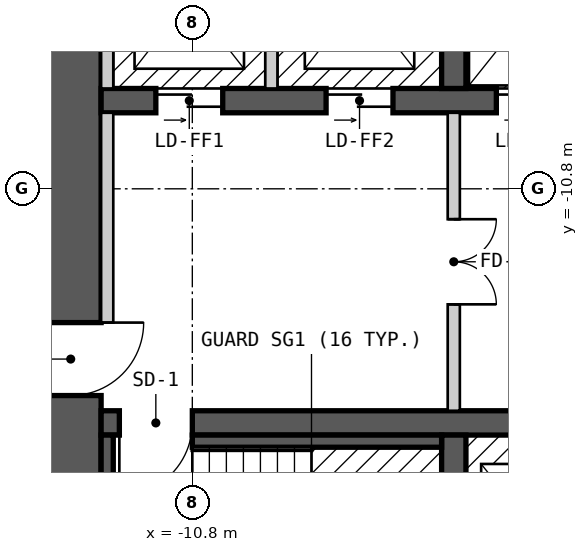
"""IFC4 building model, lengths in metres.
Left out: names, types, materials, properties, quantities, classifications, styles, units other than length and angle.
Written with IfcOpenShell. Run it as: python <this file> out.ifc"""

import sys

from ifc_helpers import new_model, si_unit, direction, frame, frame_2d, origin, place, context, subcontext, project, spatial, rectangle, extrude, element, fill, save


model = new_model("IFC4")
c1 = context("Model", 3, precision=1e-05, world=origin(), true_north=direction((0.0, 1.0)))
c2 = subcontext(c1, "Body", "Model", "MODEL_VIEW")
j1 = project(units=[si_unit("LENGTHUNIT", "METRE"), si_unit("PLANEANGLEUNIT", "RADIAN")], contexts=[c1])
p1 = place(None, origin())
s1 = spatial("IfcSite", under=j1, at=p1, CompositionType="ELEMENT")
p2 = place(p1, origin())
s2 = spatial("IfcBuilding", under=s1, at=p2, CompositionType="ELEMENT")
p3 = place(p2, frame((0.0, 0.0, 90.0)))
s3 = spatial("IfcBuildingStorey", under=s2, at=p3, CompositionType="ELEMENT", Elevation=90.0)
p4 = place(p3, frame((-12.8, -18.0, 0.0), z_axis=(0.0, 0.0, 1.0), x_axis=(0.0, 1.0, 0.0)))
e1 = element("IfcWall", 1, at=p4, inside=s3, PredefinedType="SHEAR", context=c2, shape_type="SweptSolid", body=[
    extrude(rectangle(XDim=12.0, YDim=1.0, at=frame_2d((6.0, 0.0))), origin(), (0.0, 0.0, 1.0), 2.7),
])
p5 = place(p4, frame((3.8, 0.0, 0.0)))
e2 = element("IfcOpeningElement", 2, at=p5, cuts=e1, PredefinedType="OPENING", context=c2, shape_type="SweptSolid", body=[
    extrude(rectangle(XDim=1.2, YDim=2.1, at=frame_2d((0.6, 1.05))), frame((0.0, 0.51, 0.0), z_axis=(0.0, -1.0, 0.0), x_axis=(1.0, 0.0, 0.0)), (0.0, 0.0, 1.0), 1.02),
])
p6 = place(p3, frame((-12.3, -14.65, 0.0), z_axis=(0.0, 0.0, 1.0), x_axis=(1.0, 0.0, 0.0)))
e3 = element("IfcWall", 3, at=p6, inside=s3, PredefinedType="SHEAR", context=c2, shape_type="SweptSolid", body=[
    extrude(rectangle(XDim=24.6, YDim=0.4, at=frame_2d((12.3, 0.0))), origin(), (0.0, 0.0, 1.0), 2.7),
])
p7 = place(p6, frame((1.5, 0.0, 0.0), z_axis=(0.0, 0.0, 1.0), x_axis=(-1.0, 0.0, 0.0)))
e4 = element("IfcOpeningElement", 4, at=p7, cuts=e3, PredefinedType="OPENING", context=c2, shape_type="SweptSolid", body=[
    extrude(rectangle(XDim=1.2, YDim=2.1, at=frame_2d((0.6, 1.05))), frame((0.0, 0.21, 0.0), z_axis=(0.0, -1.0, 0.0), x_axis=(1.0, 0.0, 0.0)), (0.0, 0.0, 1.0), 0.42),
])
p8 = place(p6, frame((24.35, 0.0, 0.0), z_axis=(0.0, 0.0, 1.0), x_axis=(-1.0, 0.0, 0.0)))
e5 = element("IfcOpeningElement", 5, at=p8, cuts=e3, PredefinedType="OPENING", context=c2, shape_type="SweptSolid", body=[
    extrude(rectangle(XDim=1.2, YDim=2.1, at=frame_2d((0.6, 1.05))), frame((0.0, 0.21, 0.0), z_axis=(0.0, -1.0, 0.0), x_axis=(1.0, 0.0, 0.0)), (0.0, 0.0, 1.0), 0.42),
])
p9 = place(p6, frame((16.8, 0.0, 0.0), z_axis=(0.0, 0.0, 1.0), x_axis=(-1.0, 0.0, 0.0)))
e6 = element("IfcOpeningElement", 6, at=p9, cuts=e3, PredefinedType="OPENING", context=c2, shape_type="SweptSolid", body=[
    extrude(rectangle(XDim=1.0, YDim=2.1, at=frame_2d((0.5, 1.05))), frame((0.0, 0.21, 0.0), z_axis=(0.0, -1.0, 0.0), x_axis=(1.0, 0.0, 0.0)), (0.0, 0.0, 1.0), 0.42),
])
p10 = place(p6, frame((18.55, 0.0, 0.0), z_axis=(0.0, 0.0, 1.0), x_axis=(-1.0, 0.0, 0.0)))
e7 = element("IfcOpeningElement", 7, at=p10, cuts=e3, PredefinedType="OPENING", context=c2, shape_type="SweptSolid", body=[
    extrude(rectangle(XDim=0.9, YDim=2.1, at=frame_2d((0.45, 1.05))), frame((0.0, 0.21, 0.0), z_axis=(0.0, -1.0, 0.0), x_axis=(1.0, 0.0, 0.0)), (0.0, 0.0, 1.0), 0.42),
])
p11 = place(p3, frame((-12.3, -9.35, 0.0), z_axis=(0.0, 0.0, 1.0), x_axis=(1.0, 0.0, 0.0)))
e8 = element("IfcWall", 8, at=p11, inside=s3, PredefinedType="SHEAR", context=c2, shape_type="SweptSolid", body=[
    extrude(rectangle(XDim=22.5, YDim=0.4, at=frame_2d((11.25, 0.0))), origin(), (0.0, 0.0, 1.0), 2.7),
])
p12 = place(p11, frame((0.9, 0.0, 0.0)))
e9 = element("IfcOpeningElement", 9, at=p12, cuts=e8, PredefinedType="OPENING", context=c2, shape_type="SweptSolid", body=[
    extrude(rectangle(XDim=1.1, YDim=2.1, at=frame_2d((0.55, 1.05))), frame((0.0, 0.21, 0.0), z_axis=(0.0, -1.0, 0.0), x_axis=(1.0, 0.0, 0.0)), (0.0, 0.0, 1.0), 0.42),
])
p13 = place(p11, frame((3.7, 0.0, 0.0)))
e10 = element("IfcOpeningElement", 10, at=p13, cuts=e8, PredefinedType="OPENING", context=c2, shape_type="SweptSolid", body=[
    extrude(rectangle(XDim=1.1, YDim=2.1, at=frame_2d((0.55, 1.05))), frame((0.0, 0.21, 0.0), z_axis=(0.0, -1.0, 0.0), x_axis=(1.0, 0.0, 0.0)), (0.0, 0.0, 1.0), 0.42),
])
p14 = place(p11, frame((6.5, 0.0, 0.0)))
e11 = element("IfcOpeningElement", 11, at=p14, cuts=e8, PredefinedType="OPENING", context=c2, shape_type="SweptSolid", body=[
    extrude(rectangle(XDim=1.1, YDim=2.1, at=frame_2d((0.55, 1.05))), frame((0.0, 0.21, 0.0), z_axis=(0.0, -1.0, 0.0), x_axis=(1.0, 0.0, 0.0)), (0.0, 0.0, 1.0), 0.42),
])
p15 = place(p11, frame((8.8, 0.0, 0.0)))
e12 = element("IfcOpeningElement", 12, at=p15, cuts=e8, PredefinedType="OPENING", context=c2, shape_type="SweptSolid", body=[
    extrude(rectangle(XDim=1.1, YDim=2.1, at=frame_2d((0.55, 1.05))), frame((0.0, 0.21, 0.0), z_axis=(0.0, -1.0, 0.0), x_axis=(1.0, 0.0, 0.0)), (0.0, 0.0, 1.0), 0.42),
])
p16 = place(p11, frame((11.1, 0.0, 0.0)))
e13 = element("IfcOpeningElement", 13, at=p16, cuts=e8, PredefinedType="OPENING", context=c2, shape_type="SweptSolid", body=[
    extrude(rectangle(XDim=1.1, YDim=2.1, at=frame_2d((0.55, 1.05))), frame((0.0, 0.21, 0.0), z_axis=(0.0, -1.0, 0.0), x_axis=(1.0, 0.0, 0.0)), (0.0, 0.0, 1.0), 0.42),
])
p17 = place(p11, frame((13.4, 0.0, 0.0)))
e14 = element("IfcOpeningElement", 14, at=p17, cuts=e8, PredefinedType="OPENING", context=c2, shape_type="SweptSolid", body=[
    extrude(rectangle(XDim=1.1, YDim=2.1, at=frame_2d((0.55, 1.05))), frame((0.0, 0.21, 0.0), z_axis=(0.0, -1.0, 0.0), x_axis=(1.0, 0.0, 0.0)), (0.0, 0.0, 1.0), 0.42),
])
p18 = place(p11, frame((15.7, 0.0, 0.0)))
e15 = element("IfcOpeningElement", 15, at=p18, cuts=e8, PredefinedType="OPENING", context=c2, shape_type="SweptSolid", body=[
    extrude(rectangle(XDim=1.1, YDim=2.1, at=frame_2d((0.55, 1.05))), frame((0.0, 0.21, 0.0), z_axis=(0.0, -1.0, 0.0), x_axis=(1.0, 0.0, 0.0)), (0.0, 0.0, 1.0), 0.42),
])
p19 = place(p11, frame((18.0, 0.0, 0.0)))
e16 = element("IfcOpeningElement", 16, at=p19, cuts=e8, PredefinedType="OPENING", context=c2, shape_type="SweptSolid", body=[
    extrude(rectangle(XDim=1.1, YDim=2.1, at=frame_2d((0.55, 1.05))), frame((0.0, 0.21, 0.0), z_axis=(0.0, -1.0, 0.0), x_axis=(1.0, 0.0, 0.0)), (0.0, 0.0, 1.0), 0.42),
])
p20 = place(p11, frame((20.4, 0.0, 0.0)))
e17 = element("IfcOpeningElement", 17, at=p20, cuts=e8, PredefinedType="OPENING", context=c2, shape_type="SweptSolid", body=[
    extrude(rectangle(XDim=1.1, YDim=2.1, at=frame_2d((0.55, 1.05))), frame((0.0, 0.21, 0.0), z_axis=(0.0, -1.0, 0.0), x_axis=(1.0, 0.0, 0.0)), (0.0, 0.0, 1.0), 0.42),
])
for number, where, z_axis, x_axis in (
    (18, (-6.5, -18.0, 0.0), (0.0, 0.0, 1.0), (0.0, 1.0, 0.0)),
    (19, (-6.5, -9.15, 0.0), (0.0, 0.0, 1.0), (0.0, 1.0, 0.0)),
):
    element("IfcWall", number, at=place(p3, frame(where, z_axis=z_axis, x_axis=x_axis)), inside=s3, PredefinedType="SHEAR", context=c2, shape_type="SweptSolid", body=[
        extrude(rectangle(XDim=3.15, YDim=0.4, at=frame_2d((1.575, 0.0))), origin(), (0.0, 0.0, 1.0), 2.7),
    ])
p21 = place(p3, frame((-12.2, -18.0, 0.0), z_axis=(0.0, 0.0, 1.0), x_axis=(0.0, 1.0, 0.0)))
e20 = element("IfcWall", 20, at=p21, inside=s3, PredefinedType="SOLIDWALL", context=c2, shape_type="SweptSolid", body=[
    extrude(rectangle(XDim=3.15, YDim=0.2, at=frame_2d((1.575, 0.0))), origin(), (0.0, 0.0, 1.0), 2.7),
])
p22 = place(p3, frame((-12.2, -13.0, 0.0), z_axis=(0.0, 0.0, 1.0), x_axis=(0.0, 1.0, 0.0)))
e21 = element("IfcWall", 21, at=p22, inside=s3, PredefinedType="PARTITIONING", context=c2, shape_type="SweptSolid", body=[
    extrude(rectangle(XDim=3.45, YDim=0.2, at=frame_2d((1.725, 0.0))), origin(), (0.0, 0.0, 1.0), 2.7),
])
p23 = place(p3, frame((-12.2, -9.15, 0.0), z_axis=(0.0, 0.0, 1.0), x_axis=(0.0, 1.0, 0.0)))
e22 = element("IfcWall", 22, at=p23, inside=s3, PredefinedType="SOLIDWALL", context=c2, shape_type="SweptSolid", body=[
    extrude(rectangle(XDim=3.15, YDim=0.2, at=frame_2d((1.575, 0.0))), origin(), (0.0, 0.0, 1.0), 2.7),
])
p24 = place(p3, frame((-10.8, -14.95, 0.0), z_axis=(0.0, 0.0, 1.0), x_axis=(1.0, 0.0, 0.0)))
e23 = element("IfcWall", 23, at=p24, inside=s3, PredefinedType="SOLIDWALL", context=c2, shape_type="SweptSolid", body=[
    extrude(rectangle(XDim=4.1, YDim=0.2, at=frame_2d((2.05, 0.0))), origin(), (0.0, 0.0, 1.0), 2.7),
])
p25 = place(p3, frame((-9.5, -9.15, 0.0), z_axis=(0.0, 0.0, 1.0), x_axis=(0.0, 1.0, 0.0)))
e24 = element("IfcWall", 24, at=p25, inside=s3, PredefinedType="SOLIDWALL", context=c2, shape_type="SweptSolid", body=[
    extrude(rectangle(XDim=2.95, YDim=0.2, at=frame_2d((1.475, 0.0))), origin(), (0.0, 0.0, 1.0), 2.7),
])
p26 = place(p3, frame((-6.5, -14.45, 0.0), z_axis=(0.0, 0.0, 1.0), x_axis=(0.0, 1.0, 0.0)))
e25 = element("IfcWall", 25, at=p26, inside=s3, PredefinedType="PARTITIONING", context=c2, shape_type="SweptSolid", body=[
    extrude(rectangle(XDim=4.9, YDim=0.2, at=frame_2d((2.45, 0.0))), origin(), (0.0, 0.0, 1.0), 2.7),
])
p27 = place(p26, frame((3.15, 0.0, 0.0), z_axis=(0.0, 0.0, 1.0), x_axis=(-1.0, 0.0, 0.0)))
e26 = element("IfcOpeningElement", 26, at=p27, cuts=e25, PredefinedType="OPENING", context=c2, shape_type="SweptSolid", body=[
    extrude(rectangle(XDim=1.4, YDim=2.1, at=frame_2d((0.7, 1.05))), frame((0.0, 0.11, 0.0), z_axis=(0.0, -1.0, 0.0), x_axis=(1.0, 0.0, 0.0)), (0.0, 0.0, 1.0), 0.22),
])
p28 = place(p12, origin())
e27 = element("IfcDoor", 27, at=p28, inside=s3, OperationType="DOUBLE_DOOR_SLIDING", PredefinedType="DOOR", context=c2, shape_type="SweptSolid", body=[
    extrude(rectangle(XDim=1.1, YDim=2.1, at=frame_2d((0.55, 1.05))), frame((0.0, 0.025, 0.0), z_axis=(0.0, -1.0, 0.0), x_axis=(1.0, 0.0, 0.0)), (0.0, 0.0, 1.0), 0.05),
])
fill(e9, e27)
p29 = place(p13, origin())
e28 = element("IfcDoor", 28, at=p29, inside=s3, OperationType="DOUBLE_DOOR_SLIDING", PredefinedType="DOOR", context=c2, shape_type="SweptSolid", body=[
    extrude(rectangle(XDim=1.1, YDim=2.1, at=frame_2d((0.55, 1.05))), frame((0.0, 0.025, 0.0), z_axis=(0.0, -1.0, 0.0), x_axis=(1.0, 0.0, 0.0)), (0.0, 0.0, 1.0), 0.05),
])
fill(e10, e28)
p30 = place(p14, origin())
e29 = element("IfcDoor", 29, at=p30, inside=s3, OperationType="DOUBLE_DOOR_SLIDING", PredefinedType="DOOR", context=c2, shape_type="SweptSolid", body=[
    extrude(rectangle(XDim=1.1, YDim=2.1, at=frame_2d((0.55, 1.05))), frame((0.0, 0.025, 0.0), z_axis=(0.0, -1.0, 0.0), x_axis=(1.0, 0.0, 0.0)), (0.0, 0.0, 1.0), 0.05),
])
fill(e11, e29)
p31 = place(p7, origin())
e30 = element("IfcDoor", 30, at=p31, inside=s3, OperationType="SINGLE_SWING_RIGHT", PredefinedType="DOOR", context=c2, shape_type="SweptSolid", body=[
    extrude(rectangle(XDim=1.2, YDim=2.1, at=frame_2d((0.6, 1.05))), frame((0.0, 0.025, 0.0), z_axis=(0.0, -1.0, 0.0), x_axis=(1.0, 0.0, 0.0)), (0.0, 0.0, 1.0), 0.05),
])
fill(e4, e30)
p32 = place(p5, origin())
e31 = element("IfcDoor", 31, at=p32, inside=s3, OperationType="SINGLE_SWING_RIGHT", PredefinedType="DOOR", context=c2, shape_type="SweptSolid", body=[
    extrude(rectangle(XDim=1.2, YDim=2.1, at=frame_2d((0.6, 1.05))), frame((0.0, 0.025, 0.0), z_axis=(0.0, -1.0, 0.0), x_axis=(1.0, 0.0, 0.0)), (0.0, 0.0, 1.0), 0.05),
])
fill(e2, e31)
p33 = place(p27, origin())
e32 = element("IfcDoor", 32, at=p33, inside=s3, OperationType="DOUBLE_DOOR_SINGLE_SWING", PredefinedType="DOOR", context=c2, shape_type="SweptSolid", body=[
    extrude(rectangle(XDim=1.4, YDim=2.1, at=frame_2d((0.7, 1.05))), frame((0.0, 0.025, 0.0), z_axis=(0.0, -1.0, 0.0), x_axis=(1.0, 0.0, 0.0)), (0.0, 0.0, 1.0), 0.05),
])
fill(e26, e32)
save(model, sys.argv[1])
